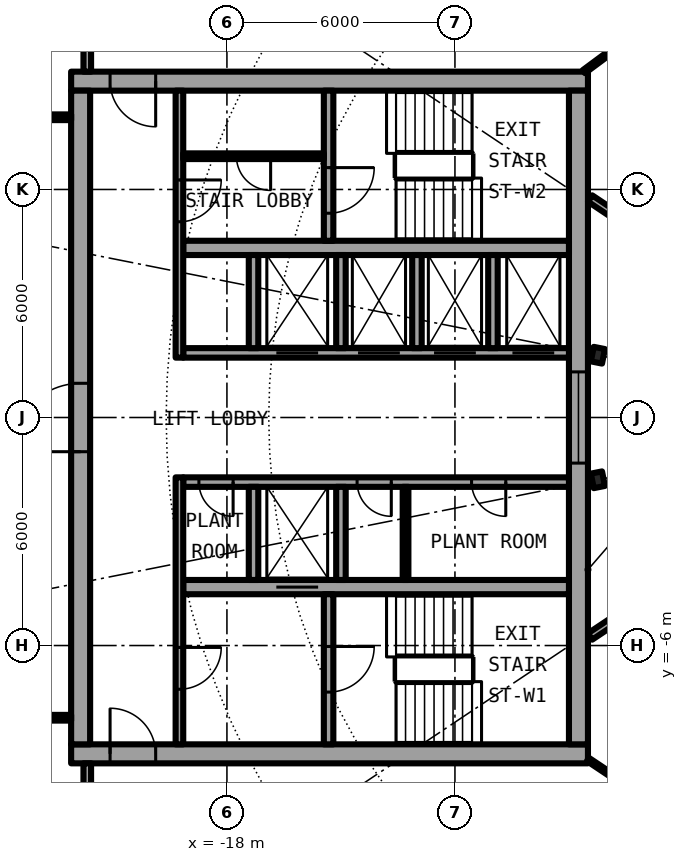
"""IFC4 building model, lengths in metres.
Left out: names, types, materials, properties, quantities, classifications, styles, units other than length and angle.
Written with IfcOpenShell. Run it as: python <this file> out.ifc"""

import sys

from ifc_helpers import new_model, si_unit, direction, frame, frame_2d, origin, origin_2d, place, context, subcontext, project, spatial, rectangle, i_section, extrude, element, fill, save


model = new_model("IFC4")
c1 = context("Model", 3, precision=1e-05, world=origin(), true_north=direction((0.0, 1.0)))
c2 = subcontext(c1, "Body", "Model", "MODEL_VIEW")
j1 = project(units=[si_unit("LENGTHUNIT", "METRE"), si_unit("PLANEANGLEUNIT", "RADIAN")], contexts=[c1])
p1 = place(None, origin())
s1 = spatial("IfcSite", under=j1, at=p1, CompositionType="ELEMENT")
p2 = place(p1, origin())
s2 = spatial("IfcBuilding", under=s1, at=p2, CompositionType="ELEMENT")
p3 = place(p2, frame((0.0, 0.0, 170.75)))
s3 = spatial("IfcBuildingStorey", under=s2, at=p3, CompositionType="ELEMENT", Elevation=170.75)
for number, where, z_axis, x_axis in (
    (1, (-8.239, 1.639, 0.0), (0.0, 0.0, 1.0), (-0.981, 0.195, 0.0)),
    (2, (-8.239, -1.639, 0.0), (0.0, 0.0, 1.0), (-0.981, -0.195, 0.0)),
):
    element("IfcColumn", number, at=place(p3, frame(where, z_axis=z_axis, x_axis=x_axis)), inside=s3, PredefinedType="COLUMN", context=c2, shape_type="SweptSolid", body=[
        extrude(i_section(OverallWidth=0.3, OverallDepth=0.39, WebThickness=0.011, FlangeThickness=0.019, FilletRadius=0.027, at=origin_2d()), origin(), (0.0, 0.0, 1.0), 3.05),
    ])
p4 = place(p3, frame((-22.1, -8.85, 0.0), z_axis=(0.0, 0.0, 1.0), x_axis=(1.0, 0.0, 0.0)))
e3 = element("IfcWall", 3, at=p4, inside=s3, PredefinedType="SHEAR", context=c2, shape_type="SweptSolid", body=[
    extrude(rectangle(XDim=13.6, YDim=0.5, at=frame_2d((6.8, 0.0))), origin(), (0.0, 0.0, 1.0), 3.05),
])
p5 = place(p4, frame((1.025, 0.0, 0.0)))
e4 = element("IfcOpeningElement", 4, at=p5, cuts=e3, PredefinedType="OPENING", context=c2, shape_type="SweptSolid", body=[
    extrude(rectangle(XDim=1.2, YDim=2.3, at=frame_2d((0.6, 1.15))), frame((0.0, 0.26, 0.0), z_axis=(0.0, -1.0, 0.0), x_axis=(1.0, 0.0, 0.0)), (0.0, 0.0, 1.0), 0.52),
])
p6 = place(p3, frame((-8.5, 8.85, 0.0), z_axis=(0.0, 0.0, 1.0), x_axis=(-1.0, 0.0, 0.0)))
e5 = element("IfcWall", 5, at=p6, inside=s3, PredefinedType="SHEAR", context=c2, shape_type="SweptSolid", body=[
    extrude(rectangle(XDim=13.6, YDim=0.5, at=frame_2d((6.8, 0.0))), origin(), (0.0, 0.0, 1.0), 3.05),
])
p7 = place(p6, frame((11.375, 0.0, 0.0)))
e6 = element("IfcOpeningElement", 6, at=p7, cuts=e5, PredefinedType="OPENING", context=c2, shape_type="SweptSolid", body=[
    extrude(rectangle(XDim=1.2, YDim=2.3, at=frame_2d((0.6, 1.15))), frame((0.0, 0.26, 0.0), z_axis=(0.0, -1.0, 0.0), x_axis=(1.0, 0.0, 0.0)), (0.0, 0.0, 1.0), 0.52),
])
p8 = place(p3, frame((-21.85, -8.6, 0.0), z_axis=(0.0, 0.0, 1.0), x_axis=(0.0, 1.0, 0.0)))
e7 = element("IfcWall", 7, at=p8, inside=s3, PredefinedType="SHEAR", context=c2, shape_type="SweptSolid", body=[
    extrude(rectangle(XDim=17.2, YDim=0.5, at=frame_2d((8.6, 0.0))), origin(), (0.0, 0.0, 1.0), 3.05),
])
p9 = place(p8, frame((7.7, 0.0, 0.0)))
e8 = element("IfcOpeningElement", 8, at=p9, cuts=e7, PredefinedType="OPENING", context=c2, shape_type="SweptSolid", body=[
    extrude(rectangle(XDim=1.8, YDim=2.3, at=frame_2d((0.9, 1.15))), frame((0.0, 0.26, 0.0), z_axis=(0.0, -1.0, 0.0), x_axis=(1.0, 0.0, 0.0)), (0.0, 0.0, 1.0), 0.52),
])
p10 = place(p3, frame((-8.75, 8.6, 0.0), z_axis=(0.0, 0.0, 1.0), x_axis=(0.0, -1.0, 0.0)))
e9 = element("IfcWall", 9, at=p10, inside=s3, PredefinedType="SHEAR", context=c2, shape_type="SweptSolid", body=[
    extrude(rectangle(XDim=17.2, YDim=0.5, at=frame_2d((8.6, 0.0))), origin(), (0.0, 0.0, 1.0), 3.05),
])
p11 = place(p10, frame((7.4, 0.0, 0.1)))
e10 = element("IfcOpeningElement", 10, at=p11, cuts=e9, PredefinedType="OPENING", context=c2, shape_type="SweptSolid", body=[
    extrude(rectangle(XDim=2.4, YDim=2.2, at=frame_2d((1.2, 1.1))), frame((0.0, 0.26, 0.0), z_axis=(0.0, -1.0, 0.0), x_axis=(1.0, 0.0, 0.0)), (0.0, 0.0, 1.0), 0.52),
])
p12 = place(p3, frame((-9.0, -1.7, 0.0), z_axis=(0.0, 0.0, 1.0), x_axis=(-1.0, 0.0, 0.0)))
e11 = element("IfcWall", 11, at=p12, inside=s3, PredefinedType="SHEAR", context=c2, shape_type="SweptSolid", body=[
    extrude(rectangle(XDim=10.15, YDim=0.25, at=frame_2d((5.075, 0.0))), origin(), (0.0, 0.0, 1.0), 3.05),
])
p13 = place(p12, frame((1.663, 0.0, 0.0)))
e12 = element("IfcOpeningElement", 12, at=p13, cuts=e11, PredefinedType="OPENING", context=c2, shape_type="SweptSolid", body=[
    extrude(rectangle(XDim=0.9, YDim=2.3, at=frame_2d((0.45, 1.15))), frame((0.0, 0.135, 0.0), z_axis=(0.0, -1.0, 0.0), x_axis=(1.0, 0.0, 0.0)), (0.0, 0.0, 1.0), 0.27),
])
p14 = place(p12, frame((4.675, 0.0, 0.0)))
e13 = element("IfcOpeningElement", 13, at=p14, cuts=e11, PredefinedType="OPENING", context=c2, shape_type="SweptSolid", body=[
    extrude(rectangle(XDim=0.9, YDim=2.3, at=frame_2d((0.45, 1.15))), frame((0.0, 0.135, 0.0), z_axis=(0.0, -1.0, 0.0), x_axis=(1.0, 0.0, 0.0)), (0.0, 0.0, 1.0), 0.27),
])
p15 = place(p12, frame((8.837, 0.0, 0.0)))
e14 = element("IfcOpeningElement", 14, at=p15, cuts=e11, PredefinedType="OPENING", context=c2, shape_type="SweptSolid", body=[
    extrude(rectangle(XDim=0.9, YDim=2.3, at=frame_2d((0.45, 1.15))), frame((0.0, 0.135, 0.0), z_axis=(0.0, -1.0, 0.0), x_axis=(1.0, 0.0, 0.0)), (0.0, 0.0, 1.0), 0.27),
])
p16 = place(p3, frame((-9.0, -4.462, 0.0), z_axis=(0.0, 0.0, 1.0), x_axis=(-1.0, 0.0, 0.0)))
e15 = element("IfcWall", 15, at=p16, inside=s3, PredefinedType="SHEAR", context=c2, shape_type="SweptSolid", body=[
    extrude(rectangle(XDim=10.15, YDim=0.375, at=frame_2d((5.075, 0.0))), origin(), (0.0, 0.0, 1.0), 3.05),
])
p17 = place(p16, frame((6.6, 0.0, 0.0)))
e16 = element("IfcOpeningElement", 16, at=p17, cuts=e15, PredefinedType="OPENING", context=c2, shape_type="SweptSolid", body=[
    extrude(rectangle(XDim=1.1, YDim=2.3, at=frame_2d((0.55, 1.15))), frame((0.0, 0.198, 0.0), z_axis=(0.0, -1.0, 0.0), x_axis=(1.0, 0.0, 0.0)), (0.0, 0.0, 1.0), 0.395),
])
p18 = place(p3, frame((-15.325, -4.65, 0.0), z_axis=(0.0, 0.0, 1.0), x_axis=(0.0, -1.0, 0.0)))
e17 = element("IfcWall", 17, at=p18, inside=s3, PredefinedType="SHEAR", context=c2, shape_type="SweptSolid", body=[
    extrude(rectangle(XDim=3.95, YDim=0.25, at=frame_2d((1.975, 0.0))), origin(), (0.0, 0.0, 1.0), 3.05),
])
p19 = place(p18, frame((1.375, 0.0, 0.0)))
e18 = element("IfcOpeningElement", 18, at=p19, cuts=e17, PredefinedType="OPENING", context=c2, shape_type="SweptSolid", body=[
    extrude(rectangle(XDim=1.2, YDim=2.3, at=frame_2d((0.6, 1.15))), frame((0.0, 0.135, 0.0), z_axis=(0.0, -1.0, 0.0), x_axis=(1.0, 0.0, 0.0)), (0.0, 0.0, 1.0), 0.27),
])
for number, where, z_axis, x_axis in (
    (19, (-15.0, -1.825, 0.0), (0.0, 0.0, 1.0), (0.0, -1.0, 0.0)),
    (20, (-17.3, -1.825, 0.0), (0.0, 0.0, 1.0), (0.0, -1.0, 0.0)),
):
    element("IfcWall", number, at=place(p3, frame(where, z_axis=z_axis, x_axis=x_axis)), inside=s3, PredefinedType="SOLIDWALL", context=c2, shape_type="SweptSolid", body=[
        extrude(rectangle(XDim=2.45, YDim=0.25, at=frame_2d((1.225, 0.0))), origin(), (0.0, 0.0, 1.0), 2.7),
    ])
p20 = place(p3, frame((-19.25, -1.575, 0.0), z_axis=(0.0, 0.0, 1.0), x_axis=(0.0, -1.0, 0.0)))
e21 = element("IfcWall", 21, at=p20, inside=s3, PredefinedType="SOLIDWALL", context=c2, shape_type="SweptSolid", body=[
    extrude(rectangle(XDim=7.025, YDim=0.2, at=frame_2d((3.513, 0.0))), origin(), (0.0, 0.0, 1.0), 2.7),
])
p21 = place(p20, frame((4.475, 0.0, 0.0)))
e22 = element("IfcOpeningElement", 22, at=p21, cuts=e21, PredefinedType="OPENING", context=c2, shape_type="SweptSolid", body=[
    extrude(rectangle(XDim=1.1, YDim=2.3, at=frame_2d((0.55, 1.15))), frame((0.0, 0.11, 0.0), z_axis=(0.0, -1.0, 0.0), x_axis=(1.0, 0.0, 0.0)), (0.0, 0.0, 1.0), 0.22),
])
p22 = place(p3, frame((-9.0, 1.7, 0.0), z_axis=(0.0, 0.0, 1.0), x_axis=(-1.0, 0.0, 0.0)))
e23 = element("IfcWall", 23, at=p22, inside=s3, PredefinedType="SHEAR", context=c2, shape_type="SweptSolid", body=[
    extrude(rectangle(XDim=10.15, YDim=0.25, at=frame_2d((5.075, 0.0))), origin(), (0.0, 0.0, 1.0), 3.05),
])
p23 = place(p22, frame((0.387, 0.0, 0.0)))
e24 = element("IfcOpeningElement", 24, at=p23, cuts=e23, PredefinedType="OPENING", context=c2, shape_type="SweptSolid", body=[
    extrude(rectangle(XDim=1.1, YDim=2.3, at=frame_2d((0.55, 1.15))), frame((0.0, 0.135, 0.0), z_axis=(0.0, -1.0, 0.0), x_axis=(1.0, 0.0, 0.0)), (0.0, 0.0, 1.0), 0.27),
])
p24 = place(p22, frame((2.45, 0.0, 0.0)))
e25 = element("IfcOpeningElement", 25, at=p24, cuts=e23, PredefinedType="OPENING", context=c2, shape_type="SweptSolid", body=[
    extrude(rectangle(XDim=1.1, YDim=2.3, at=frame_2d((0.55, 1.15))), frame((0.0, 0.135, 0.0), z_axis=(0.0, -1.0, 0.0), x_axis=(1.0, 0.0, 0.0)), (0.0, 0.0, 1.0), 0.27),
])
p25 = place(p22, frame((4.45, 0.0, 0.0)))
e26 = element("IfcOpeningElement", 26, at=p25, cuts=e23, PredefinedType="OPENING", context=c2, shape_type="SweptSolid", body=[
    extrude(rectangle(XDim=1.1, YDim=2.3, at=frame_2d((0.55, 1.15))), frame((0.0, 0.135, 0.0), z_axis=(0.0, -1.0, 0.0), x_axis=(1.0, 0.0, 0.0)), (0.0, 0.0, 1.0), 0.27),
])
p26 = place(p22, frame((6.6, 0.0, 0.0)))
e27 = element("IfcOpeningElement", 27, at=p26, cuts=e23, PredefinedType="OPENING", context=c2, shape_type="SweptSolid", body=[
    extrude(rectangle(XDim=1.1, YDim=2.3, at=frame_2d((0.55, 1.15))), frame((0.0, 0.135, 0.0), z_axis=(0.0, -1.0, 0.0), x_axis=(1.0, 0.0, 0.0)), (0.0, 0.0, 1.0), 0.27),
])
p27 = place(p3, frame((-9.0, 4.462, 0.0), z_axis=(0.0, 0.0, 1.0), x_axis=(-1.0, 0.0, 0.0)))
e28 = element("IfcWall", 28, at=p27, inside=s3, PredefinedType="SHEAR", context=c2, shape_type="SweptSolid", body=[
    extrude(rectangle(XDim=10.15, YDim=0.375, at=frame_2d((5.075, 0.0))), origin(), (0.0, 0.0, 1.0), 3.05),
])
p28 = place(p3, frame((-15.325, 8.6, 0.0), z_axis=(0.0, 0.0, 1.0), x_axis=(0.0, -1.0, 0.0)))
e29 = element("IfcWall", 29, at=p28, inside=s3, PredefinedType="SHEAR", context=c2, shape_type="SweptSolid", body=[
    extrude(rectangle(XDim=3.95, YDim=0.25, at=frame_2d((1.975, 0.0))), origin(), (0.0, 0.0, 1.0), 3.05),
])
p29 = place(p28, frame((2.025, 0.0, 0.0)))
e30 = element("IfcOpeningElement", 30, at=p29, cuts=e29, PredefinedType="OPENING", context=c2, shape_type="SweptSolid", body=[
    extrude(rectangle(XDim=1.2, YDim=2.3, at=frame_2d((0.6, 1.15))), frame((0.0, 0.135, 0.0), z_axis=(0.0, -1.0, 0.0), x_axis=(1.0, 0.0, 0.0)), (0.0, 0.0, 1.0), 0.27),
])
for number, where, z_axis, x_axis in (
    (31, (-15.0, 1.825, 0.0), (0.0, 0.0, 1.0), (0.0, 1.0, 0.0)),
    (32, (-17.3, 1.825, 0.0), (0.0, 0.0, 1.0), (0.0, 1.0, 0.0)),
):
    element("IfcWall", number, at=place(p3, frame(where, z_axis=z_axis, x_axis=x_axis)), inside=s3, PredefinedType="SOLIDWALL", context=c2, shape_type="SweptSolid", body=[
        extrude(rectangle(XDim=2.45, YDim=0.25, at=frame_2d((1.225, 0.0))), origin(), (0.0, 0.0, 1.0), 2.7),
    ])
p30 = place(p3, frame((-19.25, 8.6, 0.0), z_axis=(0.0, 0.0, 1.0), x_axis=(0.0, -1.0, 0.0)))
e33 = element("IfcWall", 33, at=p30, inside=s3, PredefinedType="SOLIDWALL", context=c2, shape_type="SweptSolid", body=[
    extrude(rectangle(XDim=7.025, YDim=0.2, at=frame_2d((3.513, 0.0))), origin(), (0.0, 0.0, 1.0), 2.7),
])
p31 = place(p30, frame((2.35, 0.0, 0.0)))
e34 = element("IfcOpeningElement", 34, at=p31, cuts=e33, PredefinedType="OPENING", context=c2, shape_type="SweptSolid", body=[
    extrude(rectangle(XDim=1.1, YDim=2.3, at=frame_2d((0.55, 1.15))), frame((0.0, 0.11, 0.0), z_axis=(0.0, -1.0, 0.0), x_axis=(1.0, 0.0, 0.0)), (0.0, 0.0, 1.0), 0.22),
])
for number, where, z_axis, x_axis in (
    (35, (-11.0, 1.825, 0.0), (0.0, 0.0, 1.0), (0.0, 1.0, 0.0)),
    (36, (-13.0, 1.825, 0.0), (0.0, 0.0, 1.0), (0.0, 1.0, 0.0)),
):
    element("IfcWall", number, at=place(p3, frame(where, z_axis=z_axis, x_axis=x_axis)), inside=s3, PredefinedType="SOLIDWALL", context=c2, shape_type="SweptSolid", body=[
        extrude(rectangle(XDim=2.45, YDim=0.25, at=frame_2d((1.225, 0.0))), origin(), (0.0, 0.0, 1.0), 2.7),
    ])
p32 = place(p3, frame((-13.3, -1.825, 0.0), z_axis=(0.0, 0.0, 1.0), x_axis=(0.0, -1.0, 0.0)))
e37 = element("IfcWall", 37, at=p32, inside=s3, PredefinedType="PARTITIONING", context=c2, shape_type="SweptSolid", body=[
    extrude(rectangle(XDim=2.45, YDim=0.15, at=frame_2d((1.225, 0.0))), origin(), (0.0, 0.0, 1.0), 2.7),
])
p33 = place(p3, frame((-15.45, 6.875, 0.0), z_axis=(0.0, 0.0, 1.0), x_axis=(-1.0, 0.0, 0.0)))
e38 = element("IfcWall", 38, at=p33, inside=s3, PredefinedType="PARTITIONING", context=c2, shape_type="SweptSolid", body=[
    extrude(rectangle(XDim=3.7, YDim=0.15, at=frame_2d((1.85, 0.0))), origin(), (0.0, 0.0, 1.0), 2.7),
])
p34 = place(p33, frame((1.4, 0.0, 0.0)))
e39 = element("IfcOpeningElement", 39, at=p34, cuts=e38, PredefinedType="OPENING", context=c2, shape_type="SweptSolid", body=[
    extrude(rectangle(XDim=0.9, YDim=2.3, at=frame_2d((0.45, 1.15))), frame((0.0, 0.085, 0.0), z_axis=(0.0, -1.0, 0.0), x_axis=(1.0, 0.0, 0.0)), (0.0, 0.0, 1.0), 0.17),
])
for number, where, z_axis, x_axis in (
    (40, (-22.1, 7.9, 0.0), (0.0, 0.0, 1.0), (-1.0, 0.0, 0.0)),
    (41, (-22.1, -7.9, 0.0), (0.0, 0.0, 1.0), (-1.0, 0.0, 0.0)),
):
    element("IfcWall", number, at=place(p3, frame(where, z_axis=z_axis, x_axis=x_axis)), inside=s3, PredefinedType="PARTITIONING", context=c2, shape_type="SweptSolid", body=[
        extrude(rectangle(XDim=2.84, YDim=0.15, at=frame_2d((1.42, 0.0))), origin(), (0.0, 0.0, 1.0), 2.7),
    ])
p35 = place(p3, frame((-8.5, -8.998, 0.0), z_axis=(0.0, 0.0, 1.0), x_axis=(0.831531456502, -0.55547766548, 0.0)))
e42 = element("IfcWall", 42, at=p35, inside=s3, PredefinedType="PARTITIONING", context=c2, shape_type="SweptSolid", body=[
    extrude(rectangle(XDim=3.333, YDim=0.1, at=frame_2d((1.666, 0.0))), origin(), (0.0, 0.0, 1.0), 2.7),
])
p36 = place(p3, frame((-6.513, -4.472, 0.0), z_axis=(0.0, 0.0, 1.0), x_axis=(-0.83133816625, -0.555766905579, 0.0)))
e43 = element("IfcWall", 43, at=p36, inside=s3, PredefinedType="PARTITIONING", context=c2, shape_type="SweptSolid", body=[
    extrude(rectangle(XDim=2.323, YDim=0.2, at=frame_2d((1.162, 0.0))), origin(), (0.0, 0.0, 1.0), 2.7),
])
p37 = place(p3, frame((-10.616, 12.875, 0.0), z_axis=(0.0, 0.0, 1.0), x_axis=(0.636045954217, -0.771651180342, 0.0)))
e44 = element("IfcWall", 44, at=p37, inside=s3, PredefinedType="PARTITIONING", context=c2, shape_type="SweptSolid", body=[
    extrude(rectangle(XDim=8.968, YDim=0.1, at=frame_2d((4.484, 0.0))), origin(), (0.0, 0.0, 1.0), 2.7),
])
p38 = place(p37, frame((1.667, 0.0, 0.0)))
e45 = element("IfcOpeningElement", 45, at=p38, cuts=e44, PredefinedType="OPENING", context=c2, shape_type="SweptSolid", body=[
    extrude(rectangle(XDim=0.9, YDim=2.3, at=frame_2d((0.45, 1.15))), frame((0.0, 0.06, 0.0), z_axis=(0.0, -1.0, 0.0), x_axis=(1.0, 0.0, 0.0)), (0.0, 0.0, 1.0), 0.12),
])
p39 = place(p37, frame((6.151, 0.0, 0.0)))
e46 = element("IfcOpeningElement", 46, at=p39, cuts=e44, PredefinedType="OPENING", context=c2, shape_type="SweptSolid", body=[
    extrude(rectangle(XDim=0.9, YDim=2.3, at=frame_2d((0.45, 1.15))), frame((0.0, 0.06, 0.0), z_axis=(0.0, -1.0, 0.0), x_axis=(1.0, 0.0, 0.0)), (0.0, 0.0, 1.0), 0.12),
])
p40 = place(p3, frame((-6.513, 4.472, 0.0), z_axis=(0.0, 0.0, 1.0), x_axis=(-0.83133816625, 0.555766905579, 0.0)))
e47 = element("IfcWall", 47, at=p40, inside=s3, PredefinedType="PARTITIONING", context=c2, shape_type="SweptSolid", body=[
    extrude(rectangle(XDim=2.323, YDim=0.2, at=frame_2d((1.162, 0.0))), origin(), (0.0, 0.0, 1.0), 2.7),
])
p41 = place(p3, frame((-8.607, 9.1, 0.0), z_axis=(0.0, 0.0, 1.0), x_axis=(0.803199066515, 0.595710718007, 0.0)))
e48 = element("IfcWall", 48, at=p41, inside=s3, PredefinedType="PARTITIONING", context=c2, shape_type="SweptSolid", body=[
    extrude(rectangle(XDim=0.858, YDim=0.1, at=frame_2d((0.429, 0.0))), origin(), (0.0, 0.0, 1.0), 2.7),
])
for number, where, z_axis, x_axis in (
    (49, (-21.675, -10.85, 0.0), (0.0, 0.0, 1.0), (0.0, 1.0, 0.0)),
    (50, (-21.675, 9.1, 0.0), (0.0, 0.0, 1.0), (0.0, 1.0, 0.0)),
):
    element("IfcWall", number, at=place(p3, frame(where, z_axis=z_axis, x_axis=x_axis)), inside=s3, PredefinedType="PARTITIONING", context=c2, shape_type="SweptSolid", body=[
        extrude(rectangle(XDim=1.75, YDim=0.2, at=frame_2d((0.875, 0.0))), origin(), (0.0, 0.0, 1.0), 2.7),
    ])
p42 = place(p17, origin())
e51 = element("IfcDoor", 51, at=p42, inside=s3, OperationType="DOUBLE_DOOR_SLIDING", PredefinedType="DOOR", context=c2, shape_type="SweptSolid", body=[
    extrude(rectangle(XDim=1.1, YDim=2.3, at=frame_2d((0.55, 1.15))), frame((0.0, 0.025, 0.0), z_axis=(0.0, -1.0, 0.0), x_axis=(1.0, 0.0, 0.0)), (0.0, 0.0, 1.0), 0.05),
])
fill(e16, e51)
p43 = place(p23, origin())
e52 = element("IfcDoor", 52, at=p43, inside=s3, OperationType="DOUBLE_DOOR_SLIDING", PredefinedType="DOOR", context=c2, shape_type="SweptSolid", body=[
    extrude(rectangle(XDim=1.1, YDim=2.3, at=frame_2d((0.55, 1.15))), frame((0.0, 0.025, 0.0), z_axis=(0.0, -1.0, 0.0), x_axis=(1.0, 0.0, 0.0)), (0.0, 0.0, 1.0), 0.05),
])
fill(e24, e52)
p44 = place(p24, origin())
e53 = element("IfcDoor", 53, at=p44, inside=s3, OperationType="DOUBLE_DOOR_SLIDING", PredefinedType="DOOR", context=c2, shape_type="SweptSolid", body=[
    extrude(rectangle(XDim=1.1, YDim=2.3, at=frame_2d((0.55, 1.15))), frame((0.0, 0.025, 0.0), z_axis=(0.0, -1.0, 0.0), x_axis=(1.0, 0.0, 0.0)), (0.0, 0.0, 1.0), 0.05),
])
fill(e25, e53)
p45 = place(p25, origin())
e54 = element("IfcDoor", 54, at=p45, inside=s3, OperationType="DOUBLE_DOOR_SLIDING", PredefinedType="DOOR", context=c2, shape_type="SweptSolid", body=[
    extrude(rectangle(XDim=1.1, YDim=2.3, at=frame_2d((0.55, 1.15))), frame((0.0, 0.025, 0.0), z_axis=(0.0, -1.0, 0.0), x_axis=(1.0, 0.0, 0.0)), (0.0, 0.0, 1.0), 0.05),
])
fill(e26, e54)
p46 = place(p26, origin())
e55 = element("IfcDoor", 55, at=p46, inside=s3, OperationType="DOUBLE_DOOR_SLIDING", PredefinedType="DOOR", context=c2, shape_type="SweptSolid", body=[
    extrude(rectangle(XDim=1.1, YDim=2.3, at=frame_2d((0.55, 1.15))), frame((0.0, 0.025, 0.0), z_axis=(0.0, -1.0, 0.0), x_axis=(1.0, 0.0, 0.0)), (0.0, 0.0, 1.0), 0.05),
])
fill(e27, e55)
p47 = place(p13, origin())
e56 = element("IfcDoor", 56, at=p47, inside=s3, OperationType="SINGLE_SWING_RIGHT", PredefinedType="DOOR", context=c2, shape_type="SweptSolid", body=[
    extrude(rectangle(XDim=0.9, YDim=2.3, at=frame_2d((0.45, 1.15))), frame((0.0, 0.025, 0.0), z_axis=(0.0, -1.0, 0.0), x_axis=(1.0, 0.0, 0.0)), (0.0, 0.0, 1.0), 0.05),
])
fill(e12, e56)
p48 = place(p14, origin())
e57 = element("IfcDoor", 57, at=p48, inside=s3, OperationType="SINGLE_SWING_LEFT", PredefinedType="DOOR", context=c2, shape_type="SweptSolid", body=[
    extrude(rectangle(XDim=0.9, YDim=2.3, at=frame_2d((0.45, 1.15))), frame((0.0, 0.025, 0.0), z_axis=(0.0, -1.0, 0.0), x_axis=(1.0, 0.0, 0.0)), (0.0, 0.0, 1.0), 0.05),
])
fill(e13, e57)
p49 = place(p15, origin())
e58 = element("IfcDoor", 58, at=p49, inside=s3, OperationType="SINGLE_SWING_LEFT", PredefinedType="DOOR", context=c2, shape_type="SweptSolid", body=[
    extrude(rectangle(XDim=0.9, YDim=2.3, at=frame_2d((0.45, 1.15))), frame((0.0, 0.025, 0.0), z_axis=(0.0, -1.0, 0.0), x_axis=(1.0, 0.0, 0.0)), (0.0, 0.0, 1.0), 0.05),
])
fill(e14, e58)
p50 = place(p34, origin())
e59 = element("IfcDoor", 59, at=p50, inside=s3, OperationType="SINGLE_SWING_LEFT", PredefinedType="DOOR", context=c2, shape_type="SweptSolid", body=[
    extrude(rectangle(XDim=0.9, YDim=2.3, at=frame_2d((0.45, 1.15))), frame((0.0, 0.025, 0.0), z_axis=(0.0, -1.0, 0.0), x_axis=(1.0, 0.0, 0.0)), (0.0, 0.0, 1.0), 0.05),
])
fill(e39, e59)
p51 = place(p19, origin())
e60 = element("IfcDoor", 60, at=p51, inside=s3, OperationType="SINGLE_SWING_LEFT", PredefinedType="DOOR", context=c2, shape_type="SweptSolid", body=[
    extrude(rectangle(XDim=1.2, YDim=2.3, at=frame_2d((0.6, 1.15))), frame((0.0, 0.025, 0.0), z_axis=(0.0, -1.0, 0.0), x_axis=(1.0, 0.0, 0.0)), (0.0, 0.0, 1.0), 0.05),
])
fill(e18, e60)
p52 = place(p29, origin())
e61 = element("IfcDoor", 61, at=p52, inside=s3, OperationType="SINGLE_SWING_LEFT", PredefinedType="DOOR", context=c2, shape_type="SweptSolid", body=[
    extrude(rectangle(XDim=1.2, YDim=2.3, at=frame_2d((0.6, 1.15))), frame((0.0, 0.025, 0.0), z_axis=(0.0, -1.0, 0.0), x_axis=(1.0, 0.0, 0.0)), (0.0, 0.0, 1.0), 0.05),
])
fill(e30, e61)
p53 = place(p21, origin())
e62 = element("IfcDoor", 62, at=p53, inside=s3, OperationType="SINGLE_SWING_LEFT", PredefinedType="DOOR", context=c2, shape_type="SweptSolid", body=[
    extrude(rectangle(XDim=1.1, YDim=2.3, at=frame_2d((0.55, 1.15))), frame((0.0, 0.025, 0.0), z_axis=(0.0, -1.0, 0.0), x_axis=(1.0, 0.0, 0.0)), (0.0, 0.0, 1.0), 0.05),
])
fill(e22, e62)
p54 = place(p31, origin())
e63 = element("IfcDoor", 63, at=p54, inside=s3, OperationType="SINGLE_SWING_RIGHT", PredefinedType="DOOR", context=c2, shape_type="SweptSolid", body=[
    extrude(rectangle(XDim=1.1, YDim=2.3, at=frame_2d((0.55, 1.15))), frame((0.0, 0.025, 0.0), z_axis=(0.0, -1.0, 0.0), x_axis=(1.0, 0.0, 0.0)), (0.0, 0.0, 1.0), 0.05),
])
fill(e34, e63)
p55 = place(p5, origin())
e64 = element("IfcDoor", 64, at=p55, inside=s3, OperationType="SINGLE_SWING_RIGHT", PredefinedType="DOOR", context=c2, shape_type="SweptSolid", body=[
    extrude(rectangle(XDim=1.2, YDim=2.3, at=frame_2d((0.6, 1.15))), frame((0.0, 0.025, 0.0), z_axis=(0.0, -1.0, 0.0), x_axis=(1.0, 0.0, 0.0)), (0.0, 0.0, 1.0), 0.05),
])
fill(e4, e64)
p56 = place(p7, origin())
e65 = element("IfcDoor", 65, at=p56, inside=s3, OperationType="SINGLE_SWING_LEFT", PredefinedType="DOOR", context=c2, shape_type="SweptSolid", body=[
    extrude(rectangle(XDim=1.2, YDim=2.3, at=frame_2d((0.6, 1.15))), frame((0.0, 0.025, 0.0), z_axis=(0.0, -1.0, 0.0), x_axis=(1.0, 0.0, 0.0)), (0.0, 0.0, 1.0), 0.05),
])
fill(e6, e65)
p57 = place(p9, origin())
e66 = element("IfcDoor", 66, at=p57, inside=s3, OperationType="SINGLE_SWING_LEFT", PredefinedType="DOOR", context=c2, shape_type="SweptSolid", body=[
    extrude(rectangle(XDim=1.8, YDim=2.3, at=frame_2d((0.9, 1.15))), frame((0.0, 0.025, 0.0), z_axis=(0.0, -1.0, 0.0), x_axis=(1.0, 0.0, 0.0)), (0.0, 0.0, 1.0), 0.05),
])
fill(e8, e66)
p58 = place(p11, origin())
e67 = element("IfcWindow", 67, at=p58, inside=s3, PartitioningType="SINGLE_PANEL", PredefinedType="WINDOW", context=c2, shape_type="SweptSolid", body=[
    extrude(rectangle(XDim=2.4, YDim=2.2, at=frame_2d((1.2, 1.1))), frame((0.0, 0.03, 0.0), z_axis=(0.0, -1.0, 0.0), x_axis=(1.0, 0.0, 0.0)), (0.0, 0.0, 1.0), 0.06),
])
fill(e10, e67)
save(model, sys.argv[1])
